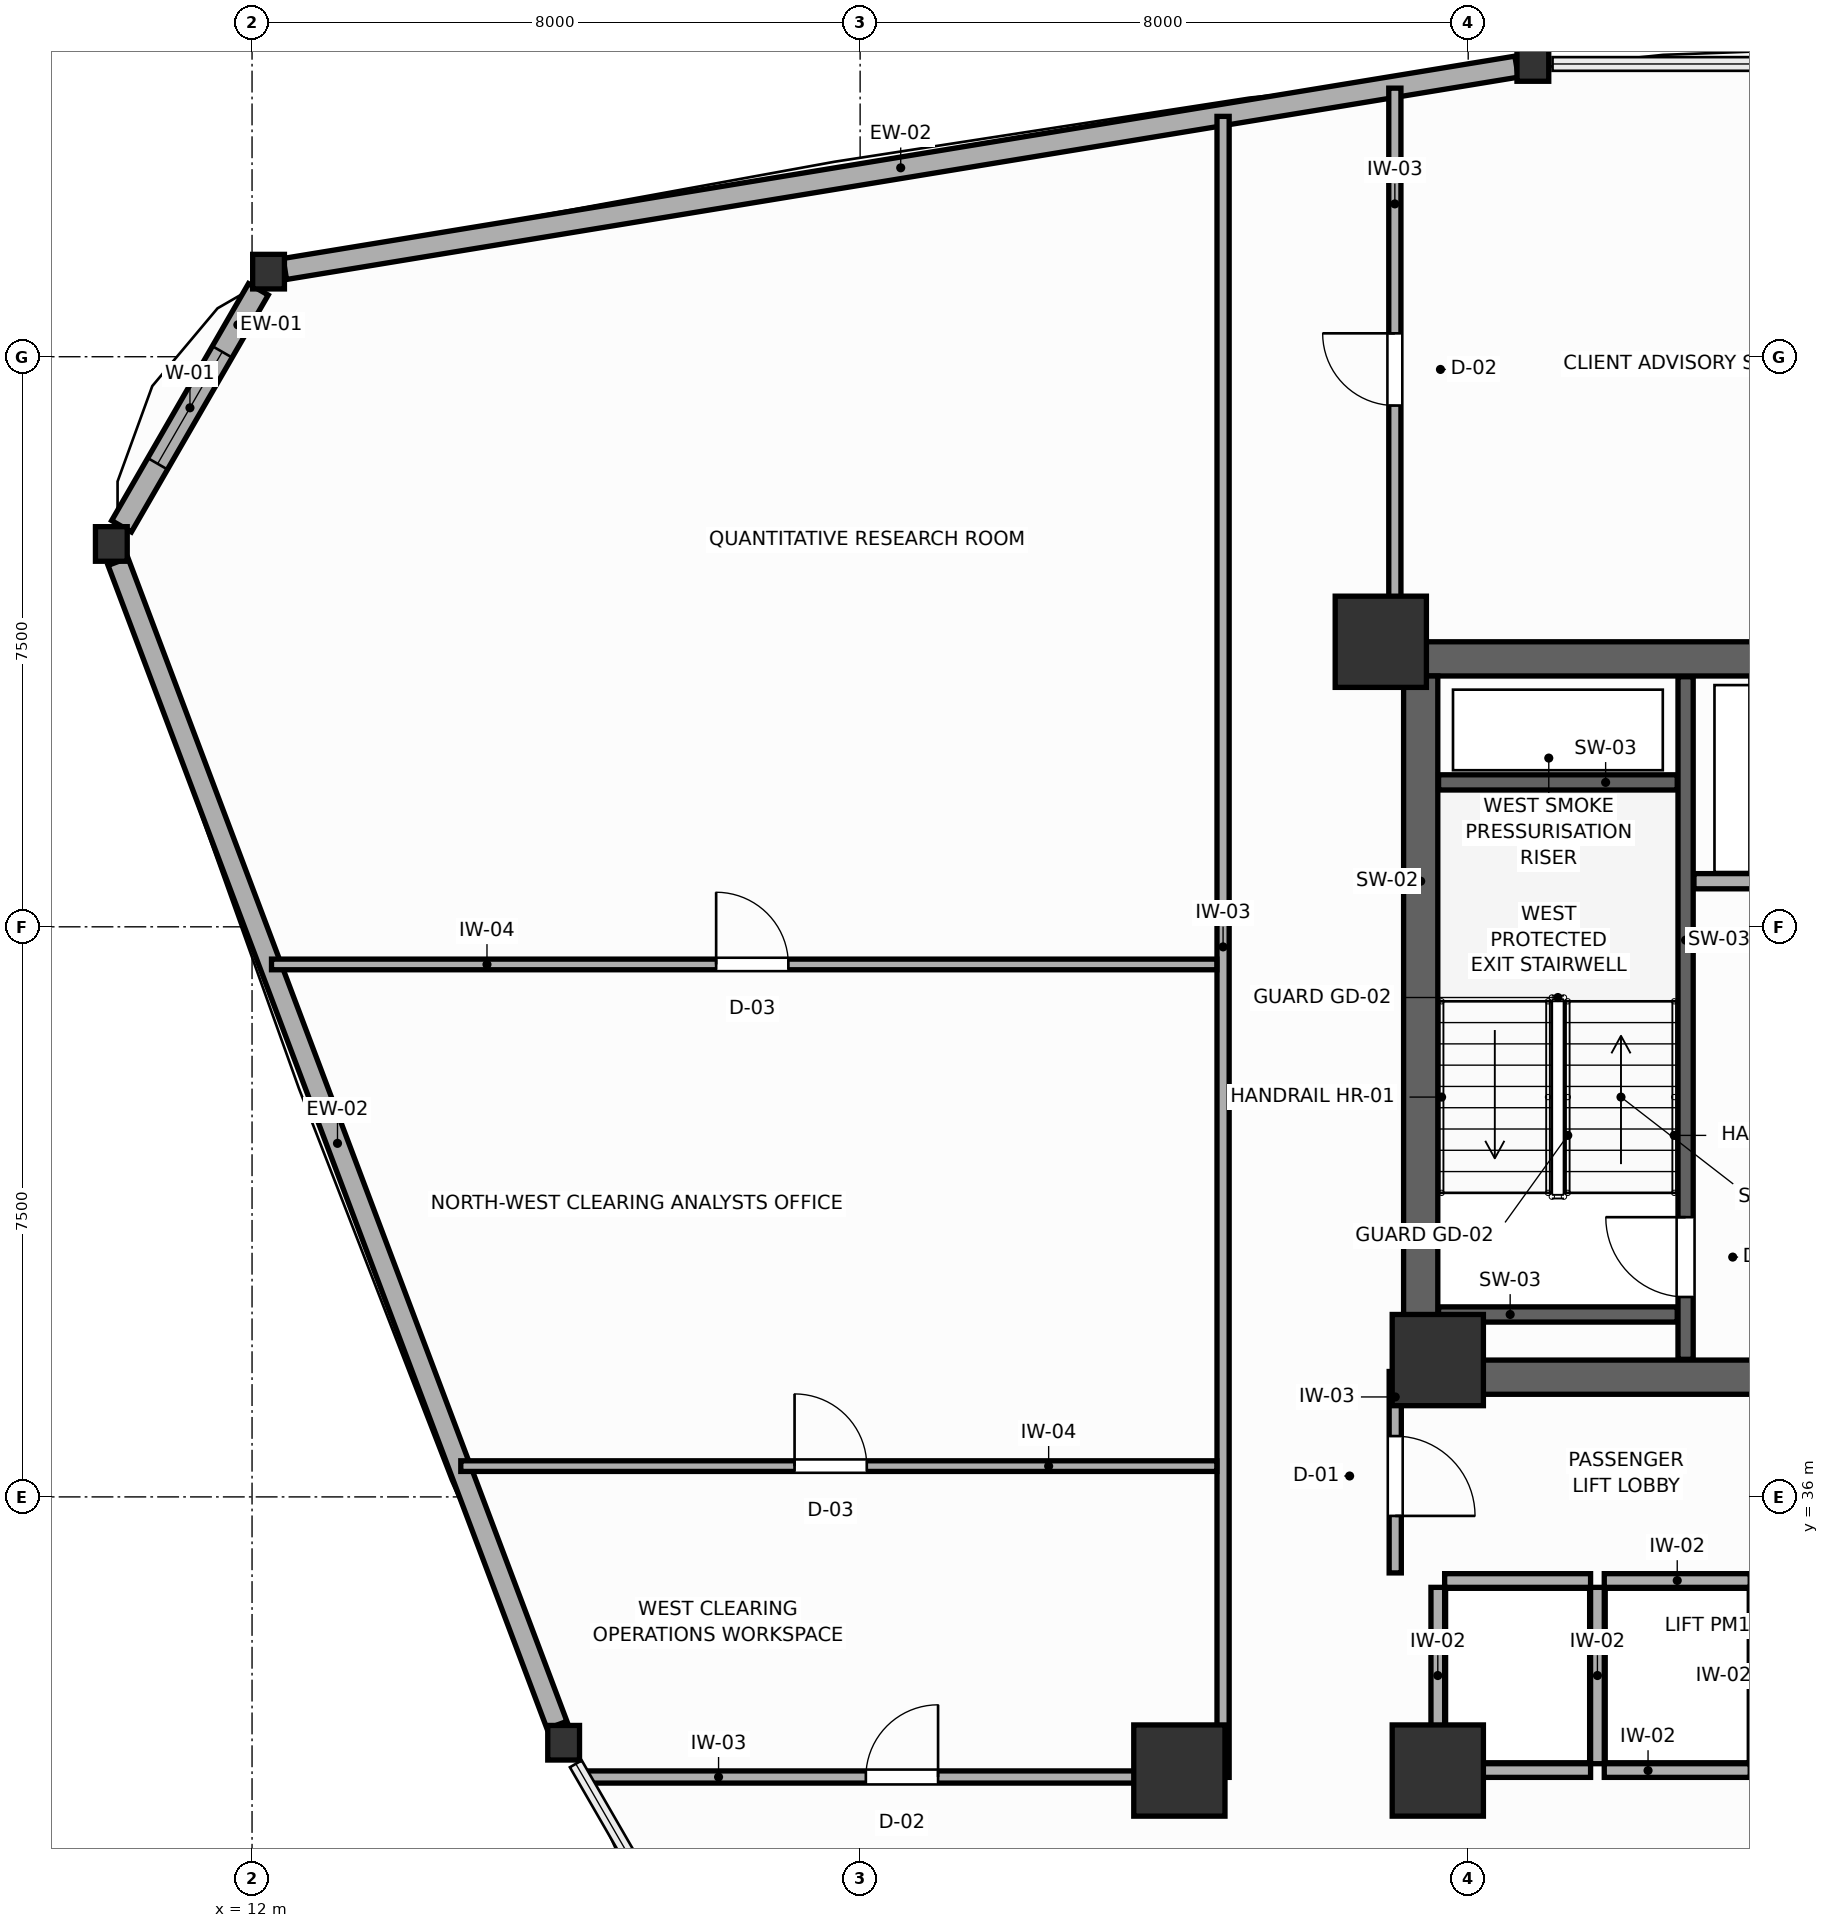
"""IFC4 building model, lengths in metres.
Left out: names, types, materials, properties, quantities, classifications, styles, units other than length and angle.
Written with IfcOpenShell. Run it as: python <this file> out.ifc"""

import sys

from ifc_helpers import new_model, si_unit, direction, frame, frame_2d, origin, origin_2d, place, context, subcontext, project, spatial, rectangle, i_section, extrude, source, transform, mapped, element, fill, save


model = new_model("IFC4")
c1 = context("Model", 3, precision=1e-05, world=origin(), true_north=direction((0.0, 1.0)))
c2 = subcontext(c1, "Body", "Model", "MODEL_VIEW")
j1 = project(units=[si_unit("LENGTHUNIT", "METRE"), si_unit("PLANEANGLEUNIT", "RADIAN")], contexts=[c1])
p1 = place(None, origin())
s1 = spatial("IfcSite", under=j1, at=p1, CompositionType="ELEMENT")
p2 = place(p1, origin())
s2 = spatial("IfcBuilding", under=s1, at=p2, CompositionType="ELEMENT")
p3 = place(p2, frame((0.0, 0.0, 102.6)))
s3 = spatial("IfcBuildingStorey", under=s2, at=p3, CompositionType="ELEMENT", Elevation=102.6)
p4 = place(p3, frame((27.15, 47.025, 0.0), z_axis=(0.0, 0.0, 1.0), x_axis=(1.0, 0.0, 0.0)))
e1 = element("IfcWall", 1, at=p4, inside=s3, PredefinedType="SHEAR", context=c2, shape_type="SweptSolid", body=[
    extrude(rectangle(XDim=17.7, YDim=0.45, at=frame_2d((8.85, 0.0))), origin(), (0.0, 0.0, 1.0), 3.6),
])
p5 = place(p3, frame((27.15, 37.575, 0.0), z_axis=(0.0, 0.0, 1.0), x_axis=(1.0, 0.0, 0.0)))
e2 = element("IfcWall", 2, at=p5, inside=s3, PredefinedType="SHEAR", context=c2, shape_type="SweptSolid", body=[
    extrude(rectangle(XDim=17.7, YDim=0.45, at=frame_2d((8.85, 0.0))), origin(), (0.0, 0.0, 1.0), 3.6),
])
p6 = place(p5, frame((4.875, 0.0, 0.0)))
e3 = element("IfcOpeningElement", 3, at=p6, cuts=e2, PredefinedType="OPENING", context=c2, shape_type="SweptSolid", body=[
    extrude(rectangle(XDim=1.05, YDim=2.1, at=frame_2d((0.525, 1.05))), frame((0.0, 0.235, 0.0), z_axis=(0.0, -1.0, 0.0), x_axis=(1.0, 0.0, 0.0)), (0.0, 0.0, 1.0), 0.47),
])
p7 = place(p5, frame((11.775, 0.0, 0.0)))
e4 = element("IfcOpeningElement", 4, at=p7, cuts=e2, PredefinedType="OPENING", context=c2, shape_type="SweptSolid", body=[
    extrude(rectangle(XDim=1.05, YDim=2.1, at=frame_2d((0.525, 1.05))), frame((0.0, 0.235, 0.0), z_axis=(0.0, -1.0, 0.0), x_axis=(1.0, 0.0, 0.0)), (0.0, 0.0, 1.0), 0.47),
])
p8 = place(p3, frame((27.375, 37.8, 0.0), z_axis=(0.0, 0.0, 1.0), x_axis=(0.0, 1.0, 0.0)))
e5 = element("IfcWall", 5, at=p8, inside=s3, PredefinedType="SHEAR", context=c2, shape_type="SweptSolid", body=[
    extrude(rectangle(XDim=9.0, YDim=0.45, at=frame_2d((4.5, 0.0))), origin(), (0.0, 0.0, 1.0), 3.6),
])
m1 = source(origin(), c2, "Body", "SweptSolid", [
    extrude(rectangle(XDim=1.2, YDim=1.2, at=origin_2d()), origin(), (0.0, 0.0, 1.0), 3.6),
])
for number, where, z_axis, x_axis in (
    (6, (26.85, 47.25, 0.0), (0.0, 0.0, 1.0), (1.0, 0.0, 0.0)),
    (7, (27.6, 37.8, 0.0), (0.0, 0.0, 1.0), (1.0, 0.0, 0.0)),
    (8, (27.6, 32.4, 0.0), (0.0, 0.0, 1.0), (1.0, 0.0, 0.0)),
    (9, (24.2, 32.4, 0.0), (0.0, 0.0, 1.0), (1.0, 0.0, 0.0)),
):
    element("IfcColumn", number, at=place(p3, frame(where, z_axis=z_axis, x_axis=x_axis)), inside=s3, PredefinedType="COLUMN", context=c2, shape_type="MappedRepresentation", body=[
        mapped(m1, transform((0.0, 0.0, 0.0), scale=1.0)),
    ])
m2 = source(origin(), c2, "Body", "SweptSolid", [
    extrude(i_section(OverallWidth=0.418, OverallDepth=0.455, WebThickness=0.039, FlangeThickness=0.063, FilletRadius=0.015, at=origin_2d()), origin(), (0.0, 0.0, 1.0), 3.6),
])
for number, where, z_axis, x_axis in (
    (10, (28.851, 54.852, 0.0), (0.0, 0.0, 1.0), (1.0, 0.0, 0.0)),
    (11, (12.217, 52.119, 0.0), (0.0, 0.0, 1.0), (1.0, 0.0, 0.0)),
    (12, (10.149, 48.537, 0.0), (0.0, 0.0, 1.0), (1.0, 0.0, 0.0)),
    (13, (16.099, 32.766, 0.0), (0.0, 0.0, 1.0), (1.0, 0.0, 0.0)),
):
    element("IfcColumn", number, at=place(p3, frame(where, z_axis=z_axis, x_axis=x_axis)), inside=s3, PredefinedType="COLUMN", context=c2, shape_type="MappedRepresentation", body=[
        mapped(m2, transform((0.0, 0.0, 0.0), scale=1.0)),
    ])
p9 = place(p3, frame((28.637, 54.816, 0.0), z_axis=(0.0, 0.0, 1.0), x_axis=(-0.986776921995, -0.162084256539, 0.0)))
e14 = element("IfcWall", 14, at=p9, inside=s3, PredefinedType="SOLIDWALL", context=c2, shape_type="SweptSolid", body=[
    extrude(rectangle(XDim=16.423, YDim=0.28, at=frame_2d((8.211, 0.0))), origin(), (0.0, 0.0, 1.0), 2.95),
])
p10 = place(p3, frame((12.083, 51.887, 0.0), z_axis=(0.0, 0.0, 1.0), x_axis=(-0.500012057535, -0.866018442252, 0.0)))
e15 = element("IfcWall", 15, at=p10, inside=s3, PredefinedType="SOLIDWALL", context=c2, shape_type="SweptSolid", body=[
    extrude(rectangle(XDim=3.6, YDim=0.3, at=frame_2d((1.8, 0.0))), origin(), (0.0, 0.0, 1.0), 3.0),
])
p11 = place(p10, frame((0.95, 0.0, 0.75)))
e16 = element("IfcOpeningElement", 16, at=p11, cuts=e15, PredefinedType="OPENING", context=c2, shape_type="SweptSolid", body=[
    extrude(rectangle(XDim=1.7, YDim=1.75, at=frame_2d((0.85, 0.875))), frame((0.0, 0.16, 0.0), z_axis=(0.0, -1.0, 0.0), x_axis=(1.0, 0.0, 0.0)), (0.0, 0.0, 1.0), 0.32),
])
p12 = place(p3, frame((10.237, 48.304, 0.0), z_axis=(0.0, 0.0, 1.0), x_axis=(0.353021512356, -0.935615204993, 0.0)))
e17 = element("IfcWall", 17, at=p12, inside=s3, PredefinedType="SOLIDWALL", context=c2, shape_type="SweptSolid", body=[
    extrude(rectangle(XDim=16.359, YDim=0.28, at=frame_2d((8.18, 0.0))), origin(), (0.0, 0.0, 1.0), 2.95),
])
p13 = place(p3, frame((30.86, 37.81, 0.0), z_axis=(0.0, 0.0, 1.0), x_axis=(0.0, 1.0, 0.0)))
e18 = element("IfcWall", 18, at=p13, inside=s3, PredefinedType="SHEAR", context=c2, shape_type="SweptSolid", body=[
    extrude(rectangle(XDim=8.98, YDim=0.2, at=frame_2d((4.49, 0.0))), origin(), (0.0, 0.0, 1.0), 3.6),
])
p14 = place(p13, frame((0.82, 0.0, 0.0)))
e19 = element("IfcOpeningElement", 19, at=p14, cuts=e18, PredefinedType="OPENING", context=c2, shape_type="SweptSolid", body=[
    extrude(rectangle(XDim=1.05, YDim=2.1, at=frame_2d((0.525, 1.05))), frame((0.0, 0.11, 0.0), z_axis=(0.0, -1.0, 0.0), x_axis=(1.0, 0.0, 0.0)), (0.0, 0.0, 1.0), 0.22),
])
for number, where, z_axis, x_axis in (
    (20, (27.61, 45.4, 0.0), (0.0, 0.0, 1.0), (1.0, 0.0, 0.0)),
    (21, (27.61, 38.4, 0.0), (0.0, 0.0, 1.0), (1.0, 0.0, 0.0)),
):
    element("IfcWall", number, at=place(p3, frame(where, z_axis=z_axis, x_axis=x_axis)), inside=s3, PredefinedType="SHEAR", context=c2, shape_type="SweptSolid", body=[
        extrude(rectangle(XDim=3.14, YDim=0.2, at=frame_2d((1.57, 0.0))), origin(), (0.0, 0.0, 1.0), 3.6),
    ])
p15 = place(p3, frame((30.97, 44.1, 0.0), z_axis=(0.0, 0.0, 1.0), x_axis=(1.0, 0.0, 0.0)))
e22 = element("IfcWall", 22, at=p15, inside=s3, PredefinedType="PARTITIONING", context=c2, shape_type="SweptSolid", body=[
    extrude(rectangle(XDim=3.38, YDim=0.2, at=frame_2d((1.69, 0.0))), origin(), (0.0, 0.0, 1.0), 3.4),
])
p16 = place(p15, frame((0.9, 0.0, 0.0)))
e23 = element("IfcOpeningElement", 23, at=p16, cuts=e22, PredefinedType="OPENING", context=c2, shape_type="SweptSolid", body=[
    extrude(rectangle(XDim=1.2, YDim=2.1, at=frame_2d((0.6, 1.05))), frame((0.0, 0.11, 0.0), z_axis=(0.0, -1.0, 0.0), x_axis=(1.0, 0.0, 0.0)), (0.0, 0.0, 1.0), 0.22),
])
p17 = place(p3, frame((27.69, 34.9, 0.0), z_axis=(0.0, 0.0, 1.0), x_axis=(1.0, 0.0, 0.0)))
e24 = element("IfcWall", 24, at=p17, inside=s3, PredefinedType="PARTITIONING", context=c2, shape_type="SweptSolid", body=[
    extrude(rectangle(XDim=1.92, YDim=0.18, at=frame_2d((0.96, 0.0))), origin(), (0.0, 0.0, 1.0), 3.4),
])
p18 = place(p3, frame((27.69, 32.4, 0.0), z_axis=(0.0, 0.0, 1.0), x_axis=(1.0, 0.0, 0.0)))
e25 = element("IfcWall", 25, at=p18, inside=s3, PredefinedType="PARTITIONING", context=c2, shape_type="SweptSolid", body=[
    extrude(rectangle(XDim=1.92, YDim=0.18, at=frame_2d((0.96, 0.0))), origin(), (0.0, 0.0, 1.0), 2.95),
])
p19 = place(p3, frame((27.6, 32.49, 0.0), z_axis=(0.0, 0.0, 1.0), x_axis=(0.0, 1.0, 0.0)))
e26 = element("IfcWall", 26, at=p19, inside=s3, PredefinedType="PARTITIONING", context=c2, shape_type="SweptSolid", body=[
    extrude(rectangle(XDim=2.32, YDim=0.18, at=frame_2d((1.16, 0.0))), origin(), (0.0, 0.0, 1.0), 3.4),
])
p20 = place(p3, frame((29.79, 34.9, 0.0), z_axis=(0.0, 0.0, 1.0), x_axis=(1.0, 0.0, 0.0)))
e27 = element("IfcWall", 27, at=p20, inside=s3, PredefinedType="PARTITIONING", context=c2, shape_type="SweptSolid", body=[
    extrude(rectangle(XDim=1.92, YDim=0.18, at=frame_2d((0.96, 0.0))), origin(), (0.0, 0.0, 1.0), 3.4),
])
p21 = place(p3, frame((29.79, 32.4, 0.0), z_axis=(0.0, 0.0, 1.0), x_axis=(1.0, 0.0, 0.0)))
e28 = element("IfcWall", 28, at=p21, inside=s3, PredefinedType="PARTITIONING", context=c2, shape_type="SweptSolid", body=[
    extrude(rectangle(XDim=1.92, YDim=0.18, at=frame_2d((0.96, 0.0))), origin(), (0.0, 0.0, 1.0), 2.95),
])
p22 = place(p3, frame((29.7, 32.49, 0.0), z_axis=(0.0, 0.0, 1.0), x_axis=(0.0, 1.0, 0.0)))
e29 = element("IfcWall", 29, at=p22, inside=s3, PredefinedType="PARTITIONING", context=c2, shape_type="SweptSolid", body=[
    extrude(rectangle(XDim=2.32, YDim=0.18, at=frame_2d((1.16, 0.0))), origin(), (0.0, 0.0, 1.0), 3.4),
])
p23 = place(p3, frame((27.04, 35.0, 0.0), z_axis=(0.0, 0.0, 1.0), x_axis=(0.0, 1.0, 0.0)))
e30 = element("IfcWall", 30, at=p23, inside=s3, PredefinedType="PARTITIONING", context=c2, shape_type="SweptSolid", body=[
    extrude(rectangle(XDim=2.65, YDim=0.16, at=frame_2d((1.325, 0.0))), origin(), (0.0, 0.0, 1.0), 3.4),
])
p24 = place(p23, frame((0.75, 0.0, 0.0)))
e31 = element("IfcOpeningElement", 31, at=p24, cuts=e30, PredefinedType="OPENING", context=c2, shape_type="SweptSolid", body=[
    extrude(rectangle(XDim=1.05, YDim=2.1, at=frame_2d((0.525, 1.05))), frame((0.0, 0.09, 0.0), z_axis=(0.0, -1.0, 0.0), x_axis=(1.0, 0.0, 0.0)), (0.0, 0.0, 1.0), 0.18),
])
p25 = place(p3, frame((24.775, 32.31, 0.0), z_axis=(0.0, 0.0, 1.0), x_axis=(0.0, 1.0, 0.0)))
e32 = element("IfcWall", 32, at=p25, inside=s3, PredefinedType="PARTITIONING", context=c2, shape_type="SweptSolid", body=[
    extrude(rectangle(XDim=21.852, YDim=0.16, at=frame_2d((10.926, 0.0))), origin(), (0.0, 0.0, 1.0), 3.4),
])
p26 = place(p3, frame((16.38, 32.315, 0.0), z_axis=(0.0, 0.0, 1.0), x_axis=(1.0, 0.0, 0.0)))
e33 = element("IfcWall", 33, at=p26, inside=s3, PredefinedType="PARTITIONING", context=c2, shape_type="SweptSolid", body=[
    extrude(rectangle(XDim=8.313, YDim=0.16, at=frame_2d((4.157, 0.0))), origin(), (0.0, 0.0, 1.0), 2.95),
])
p27 = place(p26, frame((3.696, 0.0, 0.0)))
e34 = element("IfcOpeningElement", 34, at=p27, cuts=e33, PredefinedType="OPENING", context=c2, shape_type="SweptSolid", body=[
    extrude(rectangle(XDim=0.95, YDim=2.05, at=frame_2d((0.475, 1.025))), frame((0.0, 0.09, 0.0), z_axis=(0.0, -1.0, 0.0), x_axis=(1.0, 0.0, 0.0)), (0.0, 0.0, 1.0), 0.18),
])
p28 = place(p3, frame((27.035, 47.34, 0.0), z_axis=(0.0, 0.0, 1.0), x_axis=(0.0, 1.0, 0.0)))
e35 = element("IfcWall", 35, at=p28, inside=s3, PredefinedType="PARTITIONING", context=c2, shape_type="SweptSolid", body=[
    extrude(rectangle(XDim=7.193, YDim=0.16, at=frame_2d((3.597, 0.0))), origin(), (0.0, 0.0, 1.0), 2.95),
])
p29 = place(p28, frame((3.018, 0.0, 0.0)))
e36 = element("IfcOpeningElement", 36, at=p29, cuts=e35, PredefinedType="OPENING", context=c2, shape_type="SweptSolid", body=[
    extrude(rectangle(XDim=0.95, YDim=2.05, at=frame_2d((0.475, 1.025))), frame((0.0, 0.09, 0.0), z_axis=(0.0, -1.0, 0.0), x_axis=(1.0, 0.0, 0.0)), (0.0, 0.0, 1.0), 0.18),
])
p30 = place(p3, frame((12.256, 43.005, 0.0), z_axis=(0.0, 0.0, 1.0), x_axis=(1.0, 0.0, 0.0)))
e37 = element("IfcWall", 37, at=p30, inside=s3, PredefinedType="PARTITIONING", context=c2, shape_type="SweptSolid", body=[
    extrude(rectangle(XDim=12.437, YDim=0.14, at=frame_2d((6.219, 0.0))), origin(), (0.0, 0.0, 1.0), 3.4),
])
p31 = place(p30, frame((5.85, 0.0, 0.0)))
e38 = element("IfcOpeningElement", 38, at=p31, cuts=e37, PredefinedType="OPENING", context=c2, shape_type="SweptSolid", body=[
    extrude(rectangle(XDim=0.95, YDim=2.05, at=frame_2d((0.475, 1.025))), frame((0.0, 0.08, 0.0), z_axis=(0.0, -1.0, 0.0), x_axis=(1.0, 0.0, 0.0)), (0.0, 0.0, 1.0), 0.16),
])
p32 = place(p3, frame((14.746, 36.405, 0.0), z_axis=(0.0, 0.0, 1.0), x_axis=(1.0, 0.0, 0.0)))
e39 = element("IfcWall", 39, at=p32, inside=s3, PredefinedType="PARTITIONING", context=c2, shape_type="SweptSolid", body=[
    extrude(rectangle(XDim=9.947, YDim=0.14, at=frame_2d((4.973, 0.0))), origin(), (0.0, 0.0, 1.0), 3.4),
])
p33 = place(p32, frame((4.391, 0.0, 0.0)))
e40 = element("IfcOpeningElement", 40, at=p33, cuts=e39, PredefinedType="OPENING", context=c2, shape_type="SweptSolid", body=[
    extrude(rectangle(XDim=0.95, YDim=2.05, at=frame_2d((0.475, 1.025))), frame((0.0, 0.08, 0.0), z_axis=(0.0, -1.0, 0.0), x_axis=(1.0, 0.0, 0.0)), (0.0, 0.0, 1.0), 0.16),
])
p34 = place(p11, origin())
e41 = element("IfcWindow", 41, at=p34, inside=s3, PartitioningType="SINGLE_PANEL", PredefinedType="WINDOW", context=c2, shape_type="SweptSolid", body=[
    extrude(rectangle(XDim=1.7, YDim=1.75, at=frame_2d((0.85, 0.875))), frame((0.0, 0.03, 0.0), z_axis=(0.0, -1.0, 0.0), x_axis=(1.0, 0.0, 0.0)), (0.0, 0.0, 1.0), 0.06),
])
fill(e16, e41)
p35 = place(p14, origin())
e42 = element("IfcDoor", 42, at=p35, inside=s3, OperationType="SINGLE_SWING_RIGHT", PredefinedType="DOOR", context=c2, shape_type="SweptSolid", body=[
    extrude(rectangle(XDim=1.05, YDim=2.1, at=frame_2d((0.525, 1.05))), frame((0.0, 0.025, 0.0), z_axis=(0.0, -1.0, 0.0), x_axis=(1.0, 0.0, 0.0)), (0.0, 0.0, 1.0), 0.05),
])
fill(e19, e42)
p36 = place(p24, frame((1.05, 0.0, 0.0), z_axis=(0.0, 0.0, 1.0), x_axis=(-1.0, 0.0, 0.0)))
e43 = element("IfcDoor", 43, at=p36, inside=s3, OperationType="SINGLE_SWING_RIGHT", PredefinedType="DOOR", context=c2, shape_type="SweptSolid", body=[
    extrude(rectangle(XDim=1.05, YDim=2.1, at=frame_2d((0.525, 1.05))), frame((0.0, 0.025, 0.0), z_axis=(0.0, -1.0, 0.0), x_axis=(1.0, 0.0, 0.0)), (0.0, 0.0, 1.0), 0.05),
])
fill(e31, e43)
p37 = place(p27, origin())
e44 = element("IfcDoor", 44, at=p37, inside=s3, OperationType="SINGLE_SWING_RIGHT", PredefinedType="DOOR", context=c2, shape_type="SweptSolid", body=[
    extrude(rectangle(XDim=0.95, YDim=2.05, at=frame_2d((0.475, 1.025))), frame((0.0, 0.025, 0.0), z_axis=(0.0, -1.0, 0.0), x_axis=(1.0, 0.0, 0.0)), (0.0, 0.0, 1.0), 0.05),
])
fill(e34, e44)
p38 = place(p29, origin())
e45 = element("IfcDoor", 45, at=p38, inside=s3, OperationType="SINGLE_SWING_RIGHT", PredefinedType="DOOR", context=c2, shape_type="SweptSolid", body=[
    extrude(rectangle(XDim=0.95, YDim=2.05, at=frame_2d((0.475, 1.025))), frame((0.0, 0.025, 0.0), z_axis=(0.0, -1.0, 0.0), x_axis=(1.0, 0.0, 0.0)), (0.0, 0.0, 1.0), 0.05),
])
fill(e36, e45)
p39 = place(p31, origin())
e46 = element("IfcDoor", 46, at=p39, inside=s3, OperationType="SINGLE_SWING_LEFT", PredefinedType="DOOR", context=c2, shape_type="SweptSolid", body=[
    extrude(rectangle(XDim=0.95, YDim=2.05, at=frame_2d((0.475, 1.025))), frame((0.0, 0.025, 0.0), z_axis=(0.0, -1.0, 0.0), x_axis=(1.0, 0.0, 0.0)), (0.0, 0.0, 1.0), 0.05),
])
fill(e38, e46)
p40 = place(p33, origin())
e47 = element("IfcDoor", 47, at=p40, inside=s3, OperationType="SINGLE_SWING_LEFT", PredefinedType="DOOR", context=c2, shape_type="SweptSolid", body=[
    extrude(rectangle(XDim=0.95, YDim=2.05, at=frame_2d((0.475, 1.025))), frame((0.0, 0.025, 0.0), z_axis=(0.0, -1.0, 0.0), x_axis=(1.0, 0.0, 0.0)), (0.0, 0.0, 1.0), 0.05),
])
fill(e40, e47)
save(model, sys.argv[1])
